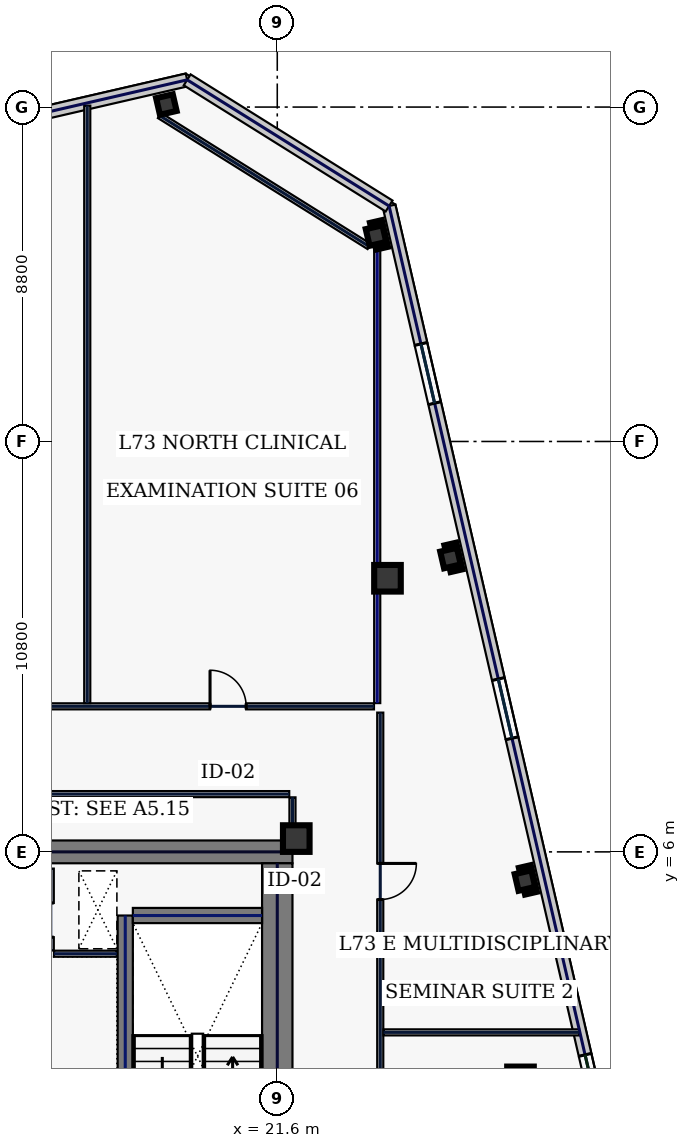
"""IFC4 building model, lengths in metres.
Left out: names, types, materials, properties, quantities, classifications, styles, units other than length and angle.
Written with IfcOpenShell. Run it as: python <this file> out.ifc"""

import sys

from ifc_helpers import new_model, si_unit, direction, frame, frame_2d, origin, origin_2d, place, context, subcontext, project, spatial, rectangle, hollow_rectangle, extrude, element, fill, save


model = new_model("IFC4")
c1 = context("Model", 3, precision=1e-05, world=origin(), true_north=direction((0.0, 1.0)))
c2 = subcontext(c1, "Body", "Model", "MODEL_VIEW")
j1 = project(units=[si_unit("LENGTHUNIT", "METRE"), si_unit("PLANEANGLEUNIT", "RADIAN")], contexts=[c1])
p1 = place(None, origin())
s1 = spatial("IfcSite", under=j1, at=p1, CompositionType="ELEMENT")
p2 = place(p1, origin())
s2 = spatial("IfcBuilding", under=s1, at=p2, CompositionType="ELEMENT")
p3 = place(p2, frame((0.0, 0.0, 313.0)))
s3 = spatial("IfcBuildingStorey", under=s2, at=p3, CompositionType="ELEMENT", Elevation=313.0)
p4 = place(p3, frame((10.5, 6.0, 0.0), z_axis=(0.0, 0.0, 1.0), x_axis=(1.0, 0.0, 0.0)))
e1 = element("IfcWall", 1, at=p4, inside=s3, PredefinedType="SHEAR", context=c2, shape_type="SweptSolid", body=[
    extrude(rectangle(XDim=11.5, YDim=0.6, at=frame_2d((5.75, 0.0))), origin(), (0.0, 0.0, 1.0), 3.74),
])
p5 = place(p3, frame((21.6, -5.7, 0.0), z_axis=(0.0, 0.0, 1.0), x_axis=(0.0, 1.0, 0.0)))
e2 = element("IfcWall", 2, at=p5, inside=s3, PredefinedType="SHEAR", context=c2, shape_type="SweptSolid", body=[
    extrude(rectangle(XDim=11.4, YDim=0.8, at=frame_2d((5.7, 0.0))), origin(), (0.0, 0.0, 1.0), 3.74),
])
p6 = place(p3, frame((17.6, -4.325, 0.0), z_axis=(0.0, 0.0, 1.0), x_axis=(0.0, 1.0, 0.0)))
e3 = element("IfcWall", 3, at=p6, inside=s3, PredefinedType="SHEAR", context=c2, shape_type="SweptSolid", body=[
    extrude(rectangle(XDim=8.65, YDim=0.4, at=frame_2d((4.325, 0.0))), origin(), (0.0, 0.0, 1.0), 3.74),
])
p7 = place(p6, frame((0.25, 0.0, 0.0)))
e4 = element("IfcOpeningElement", 4, at=p7, cuts=e3, PredefinedType="OPENING", context=c2, shape_type="SweptSolid", body=[
    extrude(rectangle(XDim=1.1, YDim=2.2, at=frame_2d((0.55, 1.1))), frame((0.0, 0.21, 0.0), z_axis=(0.0, -1.0, 0.0), x_axis=(1.0, 0.0, 0.0)), (0.0, 0.0, 1.0), 0.42),
])
p8 = place(p3, frame((17.8, 4.325, 0.0), z_axis=(0.0, 0.0, 1.0), x_axis=(1.0, 0.0, 0.0)))
e5 = element("IfcWall", 5, at=p8, inside=s3, PredefinedType="SHEAR", context=c2, shape_type="SweptSolid", body=[
    extrude(rectangle(XDim=3.4, YDim=0.4, at=frame_2d((1.7, 0.0))), origin(), (0.0, 0.0, 1.0), 3.74),
])
for number, where, z_axis, x_axis in (
    (6, (22.1, 6.35, 0.0), (0.0, 0.0, 1.0), (1.0, 0.0, 0.0)),
    (7, (24.5, 13.2, 0.0), (0.0, 0.0, 1.0), (1.0, 0.0, 0.0)),
    (8, (28.0, 0.0, 0.0), (0.0, 0.0, 1.0), (1.0, 0.0, 0.0)),
):
    element("IfcColumn", number, at=place(p3, frame(where, z_axis=z_axis, x_axis=x_axis)), inside=s3, PredefinedType="COLUMN", context=c2, shape_type="SweptSolid", body=[
        extrude(hollow_rectangle(XDim=0.7, YDim=0.7, WallThickness=0.032, at=origin_2d()), origin(), (0.0, 0.0, 1.0), 3.74),
    ])
for number, where, z_axis, x_axis in (
    (9, (18.682, 25.666, 0.0), (0.0, 0.0, 1.0), (0.974, 0.225, 0.0)),
    (10, (28.117, 5.246, 0.0), (0.0, 0.0, 1.0), (0.974, 0.225, 0.0)),
    (11, (26.158, 13.732, 0.0), (0.0, 0.0, 1.0), (0.974, 0.225, 0.0)),
    (12, (24.198, 22.219, 0.0), (0.0, 0.0, 1.0), (0.974, 0.225, 0.0)),
):
    element("IfcColumn", number, at=place(p3, frame(where, z_axis=z_axis, x_axis=x_axis)), inside=s3, PredefinedType="COLUMN", context=c2, shape_type="SweptSolid", body=[
        extrude(hollow_rectangle(XDim=0.45, YDim=0.45, WallThickness=0.022, at=origin_2d()), origin(), (0.0, 0.0, 1.0), 3.74),
    ])
p9 = place(p3, frame((19.229, 26.316, 0.0), z_axis=(0.0, 0.0, 1.0), x_axis=(-0.974371201193, -0.224946131964, 0.0)))
e13 = element("IfcWall", 13, at=p9, inside=s3, PredefinedType="STANDARD", context=c2, shape_type="SweptSolid", body=[
    extrude(rectangle(XDim=12.35, YDim=0.34, at=frame_2d((6.175, 0.0))), origin(), (0.0, 0.0, 1.0), 3.74),
])
p10 = place(p9, frame((5.553, 0.0, 1.0)))
e14 = element("IfcOpeningElement", 14, at=p10, cuts=e13, PredefinedType="OPENING", context=c2, shape_type="SweptSolid", body=[
    extrude(rectangle(XDim=1.4, YDim=1.85, at=frame_2d((0.7, 0.925))), frame((0.0, 0.18, 0.0), z_axis=(0.0, -1.0, 0.0), x_axis=(1.0, 0.0, 0.0)), (0.0, 0.0, 1.0), 0.36),
])
p11 = place(p3, frame((32.686, -12.276, 0.0), z_axis=(0.0, 0.0, 1.0), x_axis=(-0.224953091034, 0.974369594576, 0.0)))
e15 = element("IfcWall", 15, at=p11, inside=s3, PredefinedType="STANDARD", context=c2, shape_type="SweptSolid", body=[
    extrude(rectangle(XDim=36.2, YDim=0.34, at=frame_2d((18.1, 0.0))), origin(), (0.0, 0.0, 1.0), 3.74),
])
p12 = place(p11, frame((3.725, 0.0, 0.58)))
e16 = element("IfcOpeningElement", 16, at=p12, cuts=e15, PredefinedType="OPENING", context=c2, shape_type="SweptSolid", body=[
    extrude(rectangle(XDim=1.6, YDim=2.3, at=frame_2d((0.8, 1.15))), frame((0.0, 0.18, 0.0), z_axis=(0.0, -1.0, 0.0), x_axis=(1.0, 0.0, 0.0)), (0.0, 0.0, 1.0), 0.36),
])
p13 = place(p11, frame((12.425, 0.0, 0.75)))
e17 = element("IfcOpeningElement", 17, at=p13, cuts=e15, PredefinedType="OPENING", context=c2, shape_type="SweptSolid", body=[
    extrude(rectangle(XDim=0.85, YDim=1.85, at=frame_2d((0.425, 0.925))), frame((0.0, 0.18, 0.0), z_axis=(0.0, -1.0, 0.0), x_axis=(1.0, 0.0, 0.0)), (0.0, 0.0, 1.0), 0.36),
])
p14 = place(p11, frame((21.825, 0.0, 0.58)))
e18 = element("IfcOpeningElement", 18, at=p14, cuts=e15, PredefinedType="OPENING", context=c2, shape_type="SweptSolid", body=[
    extrude(rectangle(XDim=1.6, YDim=2.3, at=frame_2d((0.8, 1.15))), frame((0.0, 0.18, 0.0), z_axis=(0.0, -1.0, 0.0), x_axis=(1.0, 0.0, 0.0)), (0.0, 0.0, 1.0), 0.36),
])
p15 = place(p11, frame((30.875, 0.0, 0.58)))
e19 = element("IfcOpeningElement", 19, at=p15, cuts=e15, PredefinedType="OPENING", context=c2, shape_type="SweptSolid", body=[
    extrude(rectangle(XDim=1.6, YDim=2.3, at=frame_2d((0.8, 1.15))), frame((0.0, 0.18, 0.0), z_axis=(0.0, -1.0, 0.0), x_axis=(1.0, 0.0, 0.0)), (0.0, 0.0, 1.0), 0.36),
])
p16 = place(p3, frame((24.542, 22.996, 0.0), z_axis=(0.0, 0.0, 1.0), x_axis=(-0.848055220921, 0.529907862057, 0.0)))
e20 = element("IfcWall", 20, at=p16, inside=s3, PredefinedType="STANDARD", context=c2, shape_type="SweptSolid", body=[
    extrude(rectangle(XDim=6.265, YDim=0.34, at=frame_2d((3.132, 0.0))), origin(), (0.0, 0.0, 1.0), 3.74),
])
p17 = place(p3, frame((15.64, 3.405, 0.0), z_axis=(0.0, 0.0, 1.0), x_axis=(0.0, 1.0, 0.0)))
e21 = element("IfcWall", 21, at=p17, inside=s3, PredefinedType="PARTITIONING", context=c2, shape_type="SweptSolid", body=[
    extrude(rectangle(XDim=2.155, YDim=0.16, at=frame_2d((1.078, 0.0))), origin(), (0.0, 0.0, 1.0), 3.74),
])
p18 = place(p17, frame((0.35, 0.0, 0.0)))
e22 = element("IfcOpeningElement", 22, at=p18, cuts=e21, PredefinedType="OPENING", context=c2, shape_type="SweptSolid", body=[
    extrude(rectangle(XDim=0.9, YDim=2.2, at=frame_2d((0.45, 1.1))), frame((0.0, 0.09, 0.0), z_axis=(0.0, -1.0, 0.0), x_axis=(1.0, 0.0, 0.0)), (0.0, 0.0, 1.0), 0.18),
])
p19 = place(p3, frame((15.725, 3.32, 0.0), z_axis=(0.0, 0.0, 1.0), x_axis=(1.0, 0.0, 0.0)))
e23 = element("IfcWall", 23, at=p19, inside=s3, PredefinedType="PARTITIONING", context=c2, shape_type="SweptSolid", body=[
    extrude(rectangle(XDim=1.655, YDim=0.16, at=frame_2d((0.827, 0.0))), origin(), (0.0, 0.0, 1.0), 3.74),
])
p20 = place(p3, frame((24.018, 21.931, 0.0), z_axis=(0.0, 0.0, 1.0), x_axis=(-0.848051009591, 0.529914601736, 0.0)))
e24 = element("IfcWall", 24, at=p20, inside=s3, PredefinedType="PARTITIONING", context=c2, shape_type="SweptSolid", body=[
    extrude(rectangle(XDim=6.505, YDim=0.16, at=frame_2d((3.253, 0.0))), origin(), (0.0, 0.0, 1.0), 3.74),
])
p21 = place(p3, frame((-24.145, 9.83, 0.0), z_axis=(0.0, 0.0, 1.0), x_axis=(1.0, 0.0, 0.0)))
e25 = element("IfcWall", 25, at=p21, inside=s3, PredefinedType="PARTITIONING", context=c2, shape_type="SweptSolid", body=[
    extrude(rectangle(XDim=48.29, YDim=0.16, at=frame_2d((24.145, 0.0))), origin(), (0.0, 0.0, 1.0), 3.74),
])
p22 = place(p21, frame((2.044, 0.0, 0.0)))
e26 = element("IfcOpeningElement", 26, at=p22, cuts=e25, PredefinedType="OPENING", context=c2, shape_type="SweptSolid", body=[
    extrude(rectangle(XDim=0.95, YDim=2.2, at=frame_2d((0.475, 1.1))), frame((0.0, 0.09, 0.0), z_axis=(0.0, -1.0, 0.0), x_axis=(1.0, 0.0, 0.0)), (0.0, 0.0, 1.0), 0.18),
])
p23 = place(p21, frame((6.54, 0.0, 0.0)))
e27 = element("IfcOpeningElement", 27, at=p23, cuts=e25, PredefinedType="OPENING", context=c2, shape_type="SweptSolid", body=[
    extrude(rectangle(XDim=1.3, YDim=2.2, at=frame_2d((0.65, 1.1))), frame((0.0, 0.09, 0.0), z_axis=(0.0, -1.0, 0.0), x_axis=(1.0, 0.0, 0.0)), (0.0, 0.0, 1.0), 0.18),
])
p24 = place(p21, frame((13.83, 0.0, 0.0)))
e28 = element("IfcOpeningElement", 28, at=p24, cuts=e25, PredefinedType="OPENING", context=c2, shape_type="SweptSolid", body=[
    extrude(rectangle(XDim=1.45, YDim=2.2, at=frame_2d((0.725, 1.1))), frame((0.0, 0.09, 0.0), z_axis=(0.0, -1.0, 0.0), x_axis=(1.0, 0.0, 0.0)), (0.0, 0.0, 1.0), 0.18),
])
p25 = place(p21, frame((22.43, 0.0, 0.0)))
e29 = element("IfcOpeningElement", 29, at=p25, cuts=e25, PredefinedType="OPENING", context=c2, shape_type="SweptSolid", body=[
    extrude(rectangle(XDim=1.15, YDim=2.2, at=frame_2d((0.575, 1.1))), frame((0.0, 0.09, 0.0), z_axis=(0.0, -1.0, 0.0), x_axis=(1.0, 0.0, 0.0)), (0.0, 0.0, 1.0), 0.18),
])
p26 = place(p21, frame((29.81, 0.0, 0.0)))
e30 = element("IfcOpeningElement", 30, at=p26, cuts=e25, PredefinedType="OPENING", context=c2, shape_type="SweptSolid", body=[
    extrude(rectangle(XDim=0.95, YDim=2.2, at=frame_2d((0.475, 1.1))), frame((0.0, 0.09, 0.0), z_axis=(0.0, -1.0, 0.0), x_axis=(1.0, 0.0, 0.0)), (0.0, 0.0, 1.0), 0.18),
])
p27 = place(p21, frame((36.28, 0.0, 0.0)))
e31 = element("IfcOpeningElement", 31, at=p27, cuts=e25, PredefinedType="OPENING", context=c2, shape_type="SweptSolid", body=[
    extrude(rectangle(XDim=1.3, YDim=2.2, at=frame_2d((0.65, 1.1))), frame((0.0, 0.09, 0.0), z_axis=(0.0, -1.0, 0.0), x_axis=(1.0, 0.0, 0.0)), (0.0, 0.0, 1.0), 0.18),
])
p28 = place(p21, frame((43.976, 0.0, 0.0)))
e32 = element("IfcOpeningElement", 32, at=p28, cuts=e25, PredefinedType="OPENING", context=c2, shape_type="SweptSolid", body=[
    extrude(rectangle(XDim=0.95, YDim=2.2, at=frame_2d((0.475, 1.1))), frame((0.0, 0.09, 0.0), z_axis=(0.0, -1.0, 0.0), x_axis=(1.0, 0.0, 0.0)), (0.0, 0.0, 1.0), 0.18),
])
p29 = place(p3, frame((24.31, 9.665, 0.0), z_axis=(0.0, 0.0, 1.0), x_axis=(0.0, -1.0, 0.0)))
e33 = element("IfcWall", 33, at=p29, inside=s3, PredefinedType="PARTITIONING", context=c2, shape_type="SweptSolid", body=[
    extrude(rectangle(XDim=19.28, YDim=0.16, at=frame_2d((9.64, 0.0))), origin(), (0.0, 0.0, 1.0), 3.74),
])
p30 = place(p29, frame((13.306, 0.0, 0.0)))
e34 = element("IfcOpeningElement", 34, at=p30, cuts=e33, PredefinedType="OPENING", context=c2, shape_type="SweptSolid", body=[
    extrude(rectangle(XDim=0.95, YDim=2.2, at=frame_2d((0.475, 1.1))), frame((0.0, 0.09, 0.0), z_axis=(0.0, -1.0, 0.0), x_axis=(1.0, 0.0, 0.0)), (0.0, 0.0, 1.0), 0.18),
])
p31 = place(p29, frame((3.969, 0.0, 0.0)))
e35 = element("IfcOpeningElement", 35, at=p31, cuts=e33, PredefinedType="OPENING", context=c2, shape_type="SweptSolid", body=[
    extrude(rectangle(XDim=0.95, YDim=2.2, at=frame_2d((0.475, 1.1))), frame((0.0, 0.09, 0.0), z_axis=(0.0, -1.0, 0.0), x_axis=(1.0, 0.0, 0.0)), (0.0, 0.0, 1.0), 0.18),
])
p32 = place(p3, frame((21.915, 7.52, 0.0), z_axis=(0.0, 0.0, 1.0), x_axis=(-1.0, 0.0, 0.0)))
e36 = element("IfcWall", 36, at=p32, inside=s3, PredefinedType="PARTITIONING", context=c2, shape_type="SweptSolid", body=[
    extrude(rectangle(XDim=11.2, YDim=0.16, at=frame_2d((5.6, 0.0))), origin(), (0.0, 0.0, 1.0), 3.74),
])
p33 = place(p3, frame((22.0, 6.42, 0.0), z_axis=(0.0, 0.0, 1.0), x_axis=(0.0, 1.0, 0.0)))
e37 = element("IfcWall", 37, at=p33, inside=s3, PredefinedType="PARTITIONING", context=c2, shape_type="SweptSolid", body=[
    extrude(rectangle(XDim=1.015, YDim=0.16, at=frame_2d((0.508, 0.0))), origin(), (0.0, 0.0, 1.0), 3.74),
])
p34 = place(p3, frame((24.23, 9.915, 0.0), z_axis=(0.0, 0.0, 1.0), x_axis=(0.0, 1.0, 0.0)))
e38 = element("IfcWall", 38, at=p34, inside=s3, PredefinedType="PARTITIONING", context=c2, shape_type="SweptSolid", body=[
    extrude(rectangle(XDim=12.656, YDim=0.16, at=frame_2d((6.328, 0.0))), origin(), (0.0, 0.0, 1.0), 3.185),
])
p35 = place(p3, frame((16.6, 9.915, 0.0), z_axis=(0.0, 0.0, 1.0), x_axis=(0.0, 1.0, 0.0)))
e39 = element("IfcWall", 39, at=p35, inside=s3, PredefinedType="PARTITIONING", context=c2, shape_type="SweptSolid", body=[
    extrude(rectangle(XDim=15.722, YDim=0.16, at=frame_2d((7.861, 0.0))), origin(), (0.0, 0.0, 1.0), 3.74),
])
p36 = place(p3, frame((24.395, 1.25, 0.0), z_axis=(0.0, 0.0, 1.0), x_axis=(1.0, 0.0, 0.0)))
e40 = element("IfcWall", 40, at=p36, inside=s3, PredefinedType="PARTITIONING", context=c2, shape_type="SweptSolid", body=[
    extrude(rectangle(XDim=5.147, YDim=0.16, at=frame_2d((2.574, 0.0))), origin(), (0.0, 0.0, 1.0), 3.74),
])
p37 = place(p13, origin())
e41 = element("IfcWindow", 41, at=p37, inside=s3, PartitioningType="SINGLE_PANEL", PredefinedType="WINDOW", context=c2, shape_type="SweptSolid", body=[
    extrude(rectangle(XDim=0.85, YDim=1.85, at=frame_2d((0.425, 0.925))), frame((0.0, 0.03, 0.0), z_axis=(0.0, -1.0, 0.0), x_axis=(1.0, 0.0, 0.0)), (0.0, 0.0, 1.0), 0.06),
])
fill(e17, e41)
p38 = place(p14, origin())
e42 = element("IfcWindow", 42, at=p38, inside=s3, PartitioningType="SINGLE_PANEL", PredefinedType="WINDOW", context=c2, shape_type="SweptSolid", body=[
    extrude(rectangle(XDim=1.6, YDim=2.3, at=frame_2d((0.8, 1.15))), frame((0.0, 0.03, 0.0), z_axis=(0.0, -1.0, 0.0), x_axis=(1.0, 0.0, 0.0)), (0.0, 0.0, 1.0), 0.06),
])
fill(e18, e42)
p39 = place(p15, origin())
e43 = element("IfcWindow", 43, at=p39, inside=s3, PartitioningType="SINGLE_PANEL", PredefinedType="WINDOW", context=c2, shape_type="SweptSolid", body=[
    extrude(rectangle(XDim=1.6, YDim=2.3, at=frame_2d((0.8, 1.15))), frame((0.0, 0.03, 0.0), z_axis=(0.0, -1.0, 0.0), x_axis=(1.0, 0.0, 0.0)), (0.0, 0.0, 1.0), 0.06),
])
fill(e19, e43)
p40 = place(p28, origin())
e44 = element("IfcDoor", 44, at=p40, inside=s3, OperationType="SINGLE_SWING_LEFT", PredefinedType="DOOR", context=c2, shape_type="SweptSolid", body=[
    extrude(rectangle(XDim=0.95, YDim=2.2, at=frame_2d((0.475, 1.1))), frame((0.0, 0.025, 0.0), z_axis=(0.0, -1.0, 0.0), x_axis=(1.0, 0.0, 0.0)), (0.0, 0.0, 1.0), 0.05),
])
fill(e32, e44)
p41 = place(p31, origin())
e45 = element("IfcDoor", 45, at=p41, inside=s3, OperationType="SINGLE_SWING_LEFT", PredefinedType="DOOR", context=c2, shape_type="SweptSolid", body=[
    extrude(rectangle(XDim=0.95, YDim=2.2, at=frame_2d((0.475, 1.1))), frame((0.0, 0.025, 0.0), z_axis=(0.0, -1.0, 0.0), x_axis=(1.0, 0.0, 0.0)), (0.0, 0.0, 1.0), 0.05),
])
fill(e35, e45)
save(model, sys.argv[1])
